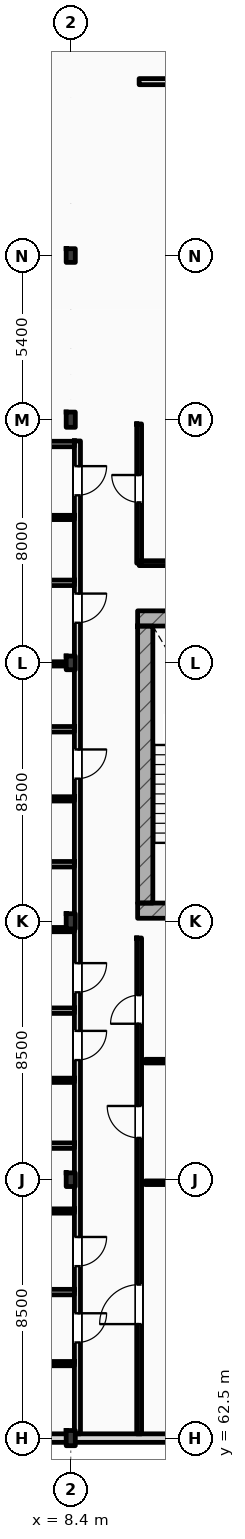
"""IFC4 building model, lengths in metres.
Left out: names, types, materials, properties, quantities, classifications, styles, units other than length and angle.
Written with IfcOpenShell. Run it as: python <this file> out.ifc"""

import sys

from ifc_helpers import new_model, si_unit, direction, frame, frame_2d, origin, origin_2d, place, context, subcontext, project, spatial, rectangle, i_section, extrude, element, fill, save


model = new_model("IFC4")
c1 = context("Model", 3, precision=1e-05, world=origin(), true_north=direction((0.0, 1.0)))
c2 = subcontext(c1, "Body", "Model", "MODEL_VIEW")
j1 = project(units=[si_unit("LENGTHUNIT", "METRE"), si_unit("PLANEANGLEUNIT", "RADIAN")], contexts=[c1])
p1 = place(None, origin())
s1 = spatial("IfcSite", under=j1, at=p1, CompositionType="ELEMENT")
p2 = place(p1, origin())
s2 = spatial("IfcBuilding", under=s1, at=p2, CompositionType="ELEMENT")
p3 = place(p2, frame((0.0, 0.0, 35.4)))
s3 = spatial("IfcBuildingStorey", under=s2, at=p3, CompositionType="ELEMENT", Elevation=35.4)
p4 = place(p3, frame((8.4, 62.5, 0.0), z_axis=(0.0, 0.0, 1.0), x_axis=(1.0, 0.0, 0.0)))
e1 = element("IfcColumn", 1, at=p4, inside=s3, PredefinedType="COLUMN", context=c2, shape_type="SweptSolid", body=[
    extrude(i_section(OverallWidth=0.3, OverallDepth=0.5, WebThickness=0.014, FlangeThickness=0.028, FilletRadius=0.027, at=origin_2d()), origin(), (0.0, 0.0, 1.0), 3.6),
])
p5 = place(p3, frame((8.4, 71.0, 0.0), z_axis=(0.0, 0.0, 1.0), x_axis=(1.0, 0.0, 0.0)))
e2 = element("IfcColumn", 2, at=p5, inside=s3, PredefinedType="COLUMN", context=c2, shape_type="SweptSolid", body=[
    extrude(i_section(OverallWidth=0.3, OverallDepth=0.45, WebThickness=0.014, FlangeThickness=0.026, FilletRadius=0.027, at=origin_2d()), origin(), (0.0, 0.0, 1.0), 3.6),
])
p6 = place(p3, frame((8.4, 79.5, 0.0), z_axis=(0.0, 0.0, 1.0), x_axis=(1.0, 0.0, 0.0)))
e3 = element("IfcColumn", 3, at=p6, inside=s3, PredefinedType="COLUMN", context=c2, shape_type="SweptSolid", body=[
    extrude(i_section(OverallWidth=0.3, OverallDepth=0.5, WebThickness=0.014, FlangeThickness=0.028, FilletRadius=0.027, at=origin_2d()), origin(), (0.0, 0.0, 1.0), 3.6),
])
p7 = place(p3, frame((8.4, 88.0, 0.0), z_axis=(0.0, 0.0, 1.0), x_axis=(1.0, 0.0, 0.0)))
e4 = element("IfcColumn", 4, at=p7, inside=s3, PredefinedType="COLUMN", context=c2, shape_type="SweptSolid", body=[
    extrude(i_section(OverallWidth=0.3, OverallDepth=0.45, WebThickness=0.014, FlangeThickness=0.026, FilletRadius=0.027, at=origin_2d()), origin(), (0.0, 0.0, 1.0), 3.6),
])
p8 = place(p3, frame((8.4, 96.0, 0.0), z_axis=(0.0, 0.0, 1.0), x_axis=(1.0, 0.0, 0.0)))
e5 = element("IfcColumn", 5, at=p8, inside=s3, PredefinedType="COLUMN", context=c2, shape_type="SweptSolid", body=[
    extrude(i_section(OverallWidth=0.3, OverallDepth=0.5, WebThickness=0.014, FlangeThickness=0.028, FilletRadius=0.027, at=origin_2d()), origin(), (0.0, 0.0, 1.0), 3.6),
])
p9 = place(p3, frame((8.4, 101.4, 0.0), z_axis=(0.0, 0.0, 1.0), x_axis=(1.0, 0.0, 0.0)))
e6 = element("IfcColumn", 6, at=p9, inside=s3, PredefinedType="COLUMN", context=c2, shape_type="SweptSolid", body=[
    extrude(i_section(OverallWidth=0.3, OverallDepth=0.45, WebThickness=0.014, FlangeThickness=0.026, FilletRadius=0.027, at=origin_2d()), origin(), (0.0, 0.0, 1.0), 3.6),
])
for number, where, z_axis, x_axis in (
    (7, (10.6, 89.462, 0.0), (0.0, 0.0, 1.0), (1.0, 0.0, 0.0)),
    (8, (10.6, 79.85, 0.0), (0.0, 0.0, 1.0), (1.0, 0.0, 0.0)),
):
    element("IfcWall", number, at=place(p3, frame(where, z_axis=z_axis, x_axis=x_axis)), inside=s3, PredefinedType="SHEAR", context=c2, shape_type="SweptSolid", body=[
        extrude(rectangle(XDim=5.16, YDim=0.5, at=frame_2d((2.58, 0.0))), origin(), (0.0, 0.0, 1.0), 3.6),
    ])
p10 = place(p3, frame((10.85, 80.1, 0.0), z_axis=(0.0, 0.0, 1.0), x_axis=(0.0, 1.0, 0.0)))
e9 = element("IfcWall", 9, at=p10, inside=s3, PredefinedType="SHEAR", context=c2, shape_type="SweptSolid", body=[
    extrude(rectangle(XDim=9.112, YDim=0.5, at=frame_2d((4.556, 0.0))), origin(), (0.0, 0.0, 1.0), 3.6),
])
p11 = place(p3, frame((0.0, 62.5, 0.0), z_axis=(0.0, 0.0, 1.0), x_axis=(1.0, 0.0, 0.0)))
e10 = element("IfcWall", 10, at=p11, inside=s3, PredefinedType="STANDARD", context=c2, shape_type="SweptSolid", body=[
    extrude(rectangle(XDim=25.2, YDim=0.28, at=frame_2d((12.6, 0.0))), origin(), (0.0, 0.0, 1.0), 2.82),
])
p12 = place(p3, frame((10.65, 107.12, 0.0), z_axis=(0.0, 0.0, 1.0), x_axis=(1.0, 0.0, 0.0)))
e11 = element("IfcWall", 11, at=p12, inside=s3, PredefinedType="PARTITIONING", context=c2, shape_type="SweptSolid", body=[
    extrude(rectangle(XDim=14.8, YDim=0.2, at=frame_2d((7.4, 0.0))), origin(), (0.0, 0.0, 1.0), 3.38),
])
p13 = place(p12, frame((8.5, 0.0, 0.0)))
e12 = element("IfcOpeningElement", 12, at=p13, cuts=e11, PredefinedType="OPENING", context=c2, shape_type="SweptSolid", body=[
    extrude(rectangle(XDim=1.25, YDim=2.15, at=frame_2d((0.625, 1.075))), frame((0.0, 0.11, 0.0), z_axis=(0.0, -1.0, 0.0), x_axis=(1.0, 0.0, 0.0)), (0.0, 0.0, 1.0), 0.22),
])
p14 = place(p3, frame((8.62, 62.64, 0.0), z_axis=(0.0, 0.0, 1.0), x_axis=(0.0, 1.0, 0.0)))
e13 = element("IfcWall", 13, at=p14, inside=s3, PredefinedType="PARTITIONING", context=c2, shape_type="SweptSolid", body=[
    extrude(rectangle(XDim=32.66, YDim=0.2, at=frame_2d((16.33, 0.0))), origin(), (0.0, 0.0, 1.0), 3.01),
])
p15 = place(p14, frame((3.006, 0.0, 0.0)))
e14 = element("IfcOpeningElement", 14, at=p15, cuts=e13, PredefinedType="OPENING", context=c2, shape_type="SweptSolid", body=[
    extrude(rectangle(XDim=0.96, YDim=2.2, at=frame_2d((0.48, 1.1))), frame((0.0, 0.11, 0.0), z_axis=(0.0, -1.0, 0.0), x_axis=(1.0, 0.0, 0.0)), (0.0, 0.0, 1.0), 0.22),
])
p16 = place(p14, frame((5.516, 0.0, 0.0)))
e15 = element("IfcOpeningElement", 15, at=p16, cuts=e13, PredefinedType="OPENING", context=c2, shape_type="SweptSolid", body=[
    extrude(rectangle(XDim=0.96, YDim=2.2, at=frame_2d((0.48, 1.1))), frame((0.0, 0.11, 0.0), z_axis=(0.0, -1.0, 0.0), x_axis=(1.0, 0.0, 0.0)), (0.0, 0.0, 1.0), 0.22),
])
p17 = place(p14, frame((12.295, 0.0, 0.0)))
e16 = element("IfcOpeningElement", 16, at=p17, cuts=e13, PredefinedType="OPENING", context=c2, shape_type="SweptSolid", body=[
    extrude(rectangle(XDim=0.96, YDim=2.2, at=frame_2d((0.48, 1.1))), frame((0.0, 0.11, 0.0), z_axis=(0.0, -1.0, 0.0), x_axis=(1.0, 0.0, 0.0)), (0.0, 0.0, 1.0), 0.22),
])
p18 = place(p14, frame((14.524, 0.0, 0.0)))
e17 = element("IfcOpeningElement", 17, at=p18, cuts=e13, PredefinedType="OPENING", context=c2, shape_type="SweptSolid", body=[
    extrude(rectangle(XDim=0.96, YDim=2.2, at=frame_2d((0.48, 1.1))), frame((0.0, 0.11, 0.0), z_axis=(0.0, -1.0, 0.0), x_axis=(1.0, 0.0, 0.0)), (0.0, 0.0, 1.0), 0.22),
])
p19 = place(p14, frame((21.552, 0.0, 0.0)))
e18 = element("IfcOpeningElement", 18, at=p19, cuts=e13, PredefinedType="OPENING", context=c2, shape_type="SweptSolid", body=[
    extrude(rectangle(XDim=0.96, YDim=2.2, at=frame_2d((0.48, 1.1))), frame((0.0, 0.11, 0.0), z_axis=(0.0, -1.0, 0.0), x_axis=(1.0, 0.0, 0.0)), (0.0, 0.0, 1.0), 0.22),
])
p20 = place(p14, frame((26.68, 0.0, 0.0)))
e19 = element("IfcOpeningElement", 19, at=p20, cuts=e13, PredefinedType="OPENING", context=c2, shape_type="SweptSolid", body=[
    extrude(rectangle(XDim=0.96, YDim=2.2, at=frame_2d((0.48, 1.1))), frame((0.0, 0.11, 0.0), z_axis=(0.0, -1.0, 0.0), x_axis=(1.0, 0.0, 0.0)), (0.0, 0.0, 1.0), 0.22),
])
p21 = place(p14, frame((30.872, 0.0, 0.0)))
e20 = element("IfcOpeningElement", 20, at=p21, cuts=e13, PredefinedType="OPENING", context=c2, shape_type="SweptSolid", body=[
    extrude(rectangle(XDim=0.96, YDim=2.2, at=frame_2d((0.48, 1.1))), frame((0.0, 0.11, 0.0), z_axis=(0.0, -1.0, 0.0), x_axis=(1.0, 0.0, 0.0)), (0.0, 0.0, 1.0), 0.22),
])
p22 = place(p3, frame((10.65, 62.64, 0.0), z_axis=(0.0, 0.0, 1.0), x_axis=(0.0, 1.0, 0.0)))
e21 = element("IfcWall", 21, at=p22, inside=s3, PredefinedType="PARTITIONING", context=c2, shape_type="SweptSolid", body=[
    extrude(rectangle(XDim=16.31, YDim=0.16, at=frame_2d((8.155, 0.0))), origin(), (0.0, 0.0, 1.0), 3.38),
])
p23 = place(p22, frame((3.61, 0.0, 0.0)))
e22 = element("IfcOpeningElement", 22, at=p23, cuts=e21, PredefinedType="OPENING", context=c2, shape_type="SweptSolid", body=[
    extrude(rectangle(XDim=1.3, YDim=2.2, at=frame_2d((0.65, 1.1))), frame((0.0, 0.09, 0.0), z_axis=(0.0, -1.0, 0.0), x_axis=(1.0, 0.0, 0.0)), (0.0, 0.0, 1.0), 0.18),
])
p24 = place(p22, frame((9.735, 0.0, 0.0)))
e23 = element("IfcOpeningElement", 23, at=p24, cuts=e21, PredefinedType="OPENING", context=c2, shape_type="SweptSolid", body=[
    extrude(rectangle(XDim=1.05, YDim=2.12, at=frame_2d((0.525, 1.06))), frame((0.0, 0.09, 0.0), z_axis=(0.0, -1.0, 0.0), x_axis=(1.0, 0.0, 0.0)), (0.0, 0.0, 1.0), 0.18),
])
p25 = place(p22, frame((13.49, 0.0, 0.0)))
e24 = element("IfcOpeningElement", 24, at=p25, cuts=e21, PredefinedType="OPENING", context=c2, shape_type="SweptSolid", body=[
    extrude(rectangle(XDim=0.94, YDim=2.15, at=frame_2d((0.47, 1.075))), frame((0.0, 0.09, 0.0), z_axis=(0.0, -1.0, 0.0), x_axis=(1.0, 0.0, 0.0)), (0.0, 0.0, 1.0), 0.18),
])
p26 = place(p3, frame((10.65, 91.28, 0.0), z_axis=(0.0, 0.0, 1.0), x_axis=(0.0, 1.0, 0.0)))
e25 = element("IfcWall", 25, at=p26, inside=s3, PredefinedType="PARTITIONING", context=c2, shape_type="SweptSolid", body=[
    extrude(rectangle(XDim=4.58, YDim=0.16, at=frame_2d((2.29, 0.0))), origin(), (0.0, 0.0, 1.0), 3.38),
])
p27 = place(p26, frame((2.0, 0.0, 0.0)))
e26 = element("IfcOpeningElement", 26, at=p27, cuts=e25, PredefinedType="OPENING", context=c2, shape_type="SweptSolid", body=[
    extrude(rectangle(XDim=0.9, YDim=2.1, at=frame_2d((0.45, 1.05))), frame((0.0, 0.09, 0.0), z_axis=(0.0, -1.0, 0.0), x_axis=(1.0, 0.0, 0.0)), (0.0, 0.0, 1.0), 0.18),
])
p28 = place(p3, frame((10.65, 91.28, 0.0), z_axis=(0.0, 0.0, 1.0), x_axis=(1.0, 0.0, 0.0)))
e27 = element("IfcWall", 27, at=p28, inside=s3, PredefinedType="PARTITIONING", context=c2, shape_type="SweptSolid", body=[
    extrude(rectangle(XDim=6.9, YDim=0.16, at=frame_2d((3.45, 0.0))), origin(), (0.0, 0.0, 1.0), 3.38),
])
p29 = place(p3, frame((0.15, 67.303, 0.0), z_axis=(0.0, 0.0, 1.0), x_axis=(1.0, 0.0, 0.0)))
e28 = element("IfcWall", 28, at=p29, inside=s3, PredefinedType="PARTITIONING", context=c2, shape_type="SweptSolid", body=[
    extrude(rectangle(XDim=8.37, YDim=0.18, at=frame_2d((4.185, 0.0))), origin(), (0.0, 0.0, 1.0), 3.38),
])
p30 = place(p3, frame((5.05, 64.95, 0.0), z_axis=(0.0, 0.0, 1.0), x_axis=(1.0, 0.0, 0.0)))
e29 = element("IfcWall", 29, at=p30, inside=s3, PredefinedType="PARTITIONING", context=c2, shape_type="SweptSolid", body=[
    extrude(rectangle(XDim=3.47, YDim=0.14, at=frame_2d((1.735, 0.0))), origin(), (0.0, 0.0, 1.0), 3.38),
])
p31 = place(p3, frame((0.15, 72.12, 0.0), z_axis=(0.0, 0.0, 1.0), x_axis=(1.0, 0.0, 0.0)))
e30 = element("IfcWall", 30, at=p31, inside=s3, PredefinedType="PARTITIONING", context=c2, shape_type="SweptSolid", body=[
    extrude(rectangle(XDim=8.37, YDim=0.18, at=frame_2d((4.185, 0.0))), origin(), (0.0, 0.0, 1.0), 3.38),
])
p32 = place(p3, frame((5.05, 69.97, 0.0), z_axis=(0.0, 0.0, 1.0), x_axis=(1.0, 0.0, 0.0)))
e31 = element("IfcWall", 31, at=p32, inside=s3, PredefinedType="PARTITIONING", context=c2, shape_type="SweptSolid", body=[
    extrude(rectangle(XDim=3.47, YDim=0.14, at=frame_2d((1.735, 0.0))), origin(), (0.0, 0.0, 1.0), 3.38),
])
p33 = place(p3, frame((0.15, 76.56, 0.0), z_axis=(0.0, 0.0, 1.0), x_axis=(1.0, 0.0, 0.0)))
e32 = element("IfcWall", 32, at=p33, inside=s3, PredefinedType="PARTITIONING", context=c2, shape_type="SweptSolid", body=[
    extrude(rectangle(XDim=8.37, YDim=0.18, at=frame_2d((4.185, 0.0))), origin(), (0.0, 0.0, 1.0), 3.38),
])
p34 = place(p3, frame((5.05, 74.27, 0.0), z_axis=(0.0, 0.0, 1.0), x_axis=(1.0, 0.0, 0.0)))
e33 = element("IfcWall", 33, at=p34, inside=s3, PredefinedType="PARTITIONING", context=c2, shape_type="SweptSolid", body=[
    extrude(rectangle(XDim=3.47, YDim=0.14, at=frame_2d((1.735, 0.0))), origin(), (0.0, 0.0, 1.0), 3.38),
])
p35 = place(p3, frame((0.15, 81.377, 0.0), z_axis=(0.0, 0.0, 1.0), x_axis=(1.0, 0.0, 0.0)))
e34 = element("IfcWall", 34, at=p35, inside=s3, PredefinedType="PARTITIONING", context=c2, shape_type="SweptSolid", body=[
    extrude(rectangle(XDim=8.37, YDim=0.18, at=frame_2d((4.185, 0.0))), origin(), (0.0, 0.0, 1.0), 3.38),
])
p36 = place(p3, frame((5.05, 79.227, 0.0), z_axis=(0.0, 0.0, 1.0), x_axis=(1.0, 0.0, 0.0)))
e35 = element("IfcWall", 35, at=p36, inside=s3, PredefinedType="PARTITIONING", context=c2, shape_type="SweptSolid", body=[
    extrude(rectangle(XDim=3.47, YDim=0.14, at=frame_2d((1.735, 0.0))), origin(), (0.0, 0.0, 1.0), 3.38),
])
p37 = place(p3, frame((0.15, 85.817, 0.0), z_axis=(0.0, 0.0, 1.0), x_axis=(1.0, 0.0, 0.0)))
e36 = element("IfcWall", 36, at=p37, inside=s3, PredefinedType="PARTITIONING", context=c2, shape_type="SweptSolid", body=[
    extrude(rectangle(XDim=8.37, YDim=0.18, at=frame_2d((4.185, 0.0))), origin(), (0.0, 0.0, 1.0), 3.38),
])
p38 = place(p3, frame((5.05, 83.527, 0.0), z_axis=(0.0, 0.0, 1.0), x_axis=(1.0, 0.0, 0.0)))
e37 = element("IfcWall", 37, at=p38, inside=s3, PredefinedType="PARTITIONING", context=c2, shape_type="SweptSolid", body=[
    extrude(rectangle(XDim=3.47, YDim=0.14, at=frame_2d((1.735, 0.0))), origin(), (0.0, 0.0, 1.0), 3.38),
])
p39 = place(p3, frame((0.15, 90.634, 0.0), z_axis=(0.0, 0.0, 1.0), x_axis=(1.0, 0.0, 0.0)))
e38 = element("IfcWall", 38, at=p39, inside=s3, PredefinedType="PARTITIONING", context=c2, shape_type="SweptSolid", body=[
    extrude(rectangle(XDim=8.37, YDim=0.18, at=frame_2d((4.185, 0.0))), origin(), (0.0, 0.0, 1.0), 3.38),
])
p40 = place(p3, frame((5.05, 87.967, 0.0), z_axis=(0.0, 0.0, 1.0), x_axis=(1.0, 0.0, 0.0)))
e39 = element("IfcWall", 39, at=p40, inside=s3, PredefinedType="PARTITIONING", context=c2, shape_type="SweptSolid", body=[
    extrude(rectangle(XDim=3.47, YDim=0.14, at=frame_2d((1.735, 0.0))), origin(), (0.0, 0.0, 1.0), 2.82),
])
p41 = place(p3, frame((0.15, 95.2, 0.0), z_axis=(0.0, 0.0, 1.0), x_axis=(1.0, 0.0, 0.0)))
e40 = element("IfcWall", 40, at=p41, inside=s3, PredefinedType="PARTITIONING", context=c2, shape_type="SweptSolid", body=[
    extrude(rectangle(XDim=8.37, YDim=0.18, at=frame_2d((4.185, 0.0))), origin(), (0.0, 0.0, 1.0), 3.38),
])
p42 = place(p3, frame((5.05, 92.784, 0.0), z_axis=(0.0, 0.0, 1.0), x_axis=(1.0, 0.0, 0.0)))
e41 = element("IfcWall", 41, at=p42, inside=s3, PredefinedType="PARTITIONING", context=c2, shape_type="SweptSolid", body=[
    extrude(rectangle(XDim=3.47, YDim=0.14, at=frame_2d((1.735, 0.0))), origin(), (0.0, 0.0, 1.0), 3.38),
])
p43 = place(p3, frame((10.85, 70.9, 0.0), z_axis=(0.0, 0.0, 1.0), x_axis=(1.0, 0.0, 0.0)))
e42 = element("IfcWall", 42, at=p43, inside=s3, PredefinedType="PARTITIONING", context=c2, shape_type="SweptSolid", body=[
    extrude(rectangle(XDim=7.35, YDim=0.12, at=frame_2d((3.675, 0.0))), origin(), (0.0, 0.0, 1.0), 2.82),
])
p44 = place(p3, frame((10.85, 74.9, 0.0), z_axis=(0.0, 0.0, 1.0), x_axis=(1.0, 0.0, 0.0)))
e43 = element("IfcWall", 43, at=p44, inside=s3, PredefinedType="PARTITIONING", context=c2, shape_type="SweptSolid", body=[
    extrude(rectangle(XDim=5.35, YDim=0.12, at=frame_2d((2.675, 0.0))), origin(), (0.0, 0.0, 1.0), 3.38),
])
p45 = place(p15, frame((0.96, 0.0, 0.0), z_axis=(0.0, 0.0, 1.0), x_axis=(-1.0, 0.0, 0.0)))
e44 = element("IfcDoor", 44, at=p45, inside=s3, OperationType="SINGLE_SWING_RIGHT", PredefinedType="DOOR", context=c2, shape_type="SweptSolid", body=[
    extrude(rectangle(XDim=0.96, YDim=2.2, at=frame_2d((0.48, 1.1))), frame((0.0, 0.025, 0.0), z_axis=(0.0, -1.0, 0.0), x_axis=(1.0, 0.0, 0.0)), (0.0, 0.0, 1.0), 0.05),
])
fill(e14, e44)
p46 = place(p16, frame((0.96, 0.0, 0.0), z_axis=(0.0, 0.0, 1.0), x_axis=(-1.0, 0.0, 0.0)))
e45 = element("IfcDoor", 45, at=p46, inside=s3, OperationType="SINGLE_SWING_RIGHT", PredefinedType="DOOR", context=c2, shape_type="SweptSolid", body=[
    extrude(rectangle(XDim=0.96, YDim=2.2, at=frame_2d((0.48, 1.1))), frame((0.0, 0.025, 0.0), z_axis=(0.0, -1.0, 0.0), x_axis=(1.0, 0.0, 0.0)), (0.0, 0.0, 1.0), 0.05),
])
fill(e15, e45)
p47 = place(p17, frame((0.96, 0.0, 0.0), z_axis=(0.0, 0.0, 1.0), x_axis=(-1.0, 0.0, 0.0)))
e46 = element("IfcDoor", 46, at=p47, inside=s3, OperationType="SINGLE_SWING_RIGHT", PredefinedType="DOOR", context=c2, shape_type="SweptSolid", body=[
    extrude(rectangle(XDim=0.96, YDim=2.2, at=frame_2d((0.48, 1.1))), frame((0.0, 0.025, 0.0), z_axis=(0.0, -1.0, 0.0), x_axis=(1.0, 0.0, 0.0)), (0.0, 0.0, 1.0), 0.05),
])
fill(e16, e46)
p48 = place(p18, frame((0.96, 0.0, 0.0), z_axis=(0.0, 0.0, 1.0), x_axis=(-1.0, 0.0, 0.0)))
e47 = element("IfcDoor", 47, at=p48, inside=s3, OperationType="SINGLE_SWING_RIGHT", PredefinedType="DOOR", context=c2, shape_type="SweptSolid", body=[
    extrude(rectangle(XDim=0.96, YDim=2.2, at=frame_2d((0.48, 1.1))), frame((0.0, 0.025, 0.0), z_axis=(0.0, -1.0, 0.0), x_axis=(1.0, 0.0, 0.0)), (0.0, 0.0, 1.0), 0.05),
])
fill(e17, e47)
p49 = place(p19, frame((0.96, 0.0, 0.0), z_axis=(0.0, 0.0, 1.0), x_axis=(-1.0, 0.0, 0.0)))
e48 = element("IfcDoor", 48, at=p49, inside=s3, OperationType="SINGLE_SWING_RIGHT", PredefinedType="DOOR", context=c2, shape_type="SweptSolid", body=[
    extrude(rectangle(XDim=0.96, YDim=2.2, at=frame_2d((0.48, 1.1))), frame((0.0, 0.025, 0.0), z_axis=(0.0, -1.0, 0.0), x_axis=(1.0, 0.0, 0.0)), (0.0, 0.0, 1.0), 0.05),
])
fill(e18, e48)
p50 = place(p20, frame((0.96, 0.0, 0.0), z_axis=(0.0, 0.0, 1.0), x_axis=(-1.0, 0.0, 0.0)))
e49 = element("IfcDoor", 49, at=p50, inside=s3, OperationType="SINGLE_SWING_RIGHT", PredefinedType="DOOR", context=c2, shape_type="SweptSolid", body=[
    extrude(rectangle(XDim=0.96, YDim=2.2, at=frame_2d((0.48, 1.1))), frame((0.0, 0.025, 0.0), z_axis=(0.0, -1.0, 0.0), x_axis=(1.0, 0.0, 0.0)), (0.0, 0.0, 1.0), 0.05),
])
fill(e19, e49)
p51 = place(p21, frame((0.96, 0.0, 0.0), z_axis=(0.0, 0.0, 1.0), x_axis=(-1.0, 0.0, 0.0)))
e50 = element("IfcDoor", 50, at=p51, inside=s3, OperationType="SINGLE_SWING_RIGHT", PredefinedType="DOOR", context=c2, shape_type="SweptSolid", body=[
    extrude(rectangle(XDim=0.96, YDim=2.2, at=frame_2d((0.48, 1.1))), frame((0.0, 0.025, 0.0), z_axis=(0.0, -1.0, 0.0), x_axis=(1.0, 0.0, 0.0)), (0.0, 0.0, 1.0), 0.05),
])
fill(e20, e50)
p52 = place(p23, origin())
e51 = element("IfcDoor", 51, at=p52, inside=s3, OperationType="SINGLE_SWING_LEFT", PredefinedType="DOOR", context=c2, shape_type="SweptSolid", body=[
    extrude(rectangle(XDim=1.3, YDim=2.2, at=frame_2d((0.65, 1.1))), frame((0.0, 0.025, 0.0), z_axis=(0.0, -1.0, 0.0), x_axis=(1.0, 0.0, 0.0)), (0.0, 0.0, 1.0), 0.05),
])
fill(e22, e51)
p53 = place(p24, origin())
e52 = element("IfcDoor", 52, at=p53, inside=s3, OperationType="SINGLE_SWING_RIGHT", PredefinedType="DOOR", context=c2, shape_type="SweptSolid", body=[
    extrude(rectangle(XDim=1.05, YDim=2.12, at=frame_2d((0.525, 1.06))), frame((0.0, 0.025, 0.0), z_axis=(0.0, -1.0, 0.0), x_axis=(1.0, 0.0, 0.0)), (0.0, 0.0, 1.0), 0.05),
])
fill(e23, e52)
p54 = place(p25, origin())
e53 = element("IfcDoor", 53, at=p54, inside=s3, OperationType="SINGLE_SWING_LEFT", PredefinedType="DOOR", context=c2, shape_type="SweptSolid", body=[
    extrude(rectangle(XDim=0.94, YDim=2.15, at=frame_2d((0.47, 1.075))), frame((0.0, 0.025, 0.0), z_axis=(0.0, -1.0, 0.0), x_axis=(1.0, 0.0, 0.0)), (0.0, 0.0, 1.0), 0.05),
])
fill(e24, e53)
p55 = place(p27, origin())
e54 = element("IfcDoor", 54, at=p55, inside=s3, OperationType="SINGLE_SWING_RIGHT", PredefinedType="DOOR", context=c2, shape_type="SweptSolid", body=[
    extrude(rectangle(XDim=0.9, YDim=2.1, at=frame_2d((0.45, 1.05))), frame((0.0, 0.025, 0.0), z_axis=(0.0, -1.0, 0.0), x_axis=(1.0, 0.0, 0.0)), (0.0, 0.0, 1.0), 0.05),
])
fill(e26, e54)
save(model, sys.argv[1])
